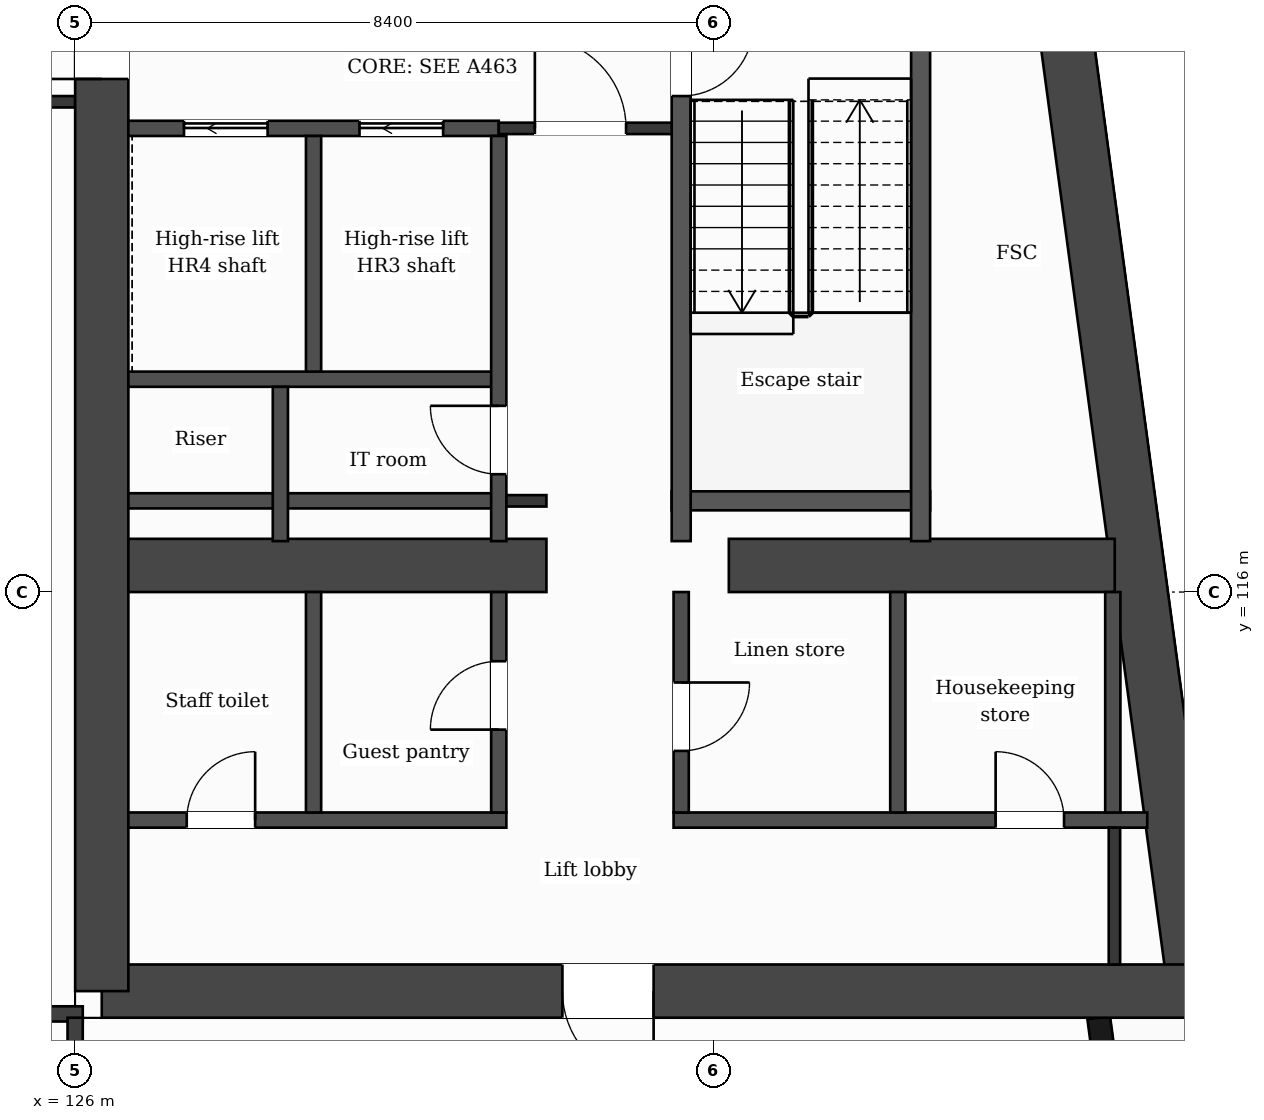
"""IFC4 building model, lengths in metres.
Left out: names, types, materials, properties, quantities, classifications, styles, units other than length and angle.
Written with IfcOpenShell. Run it as: python <this file> out.ifc"""

import sys

from ifc_helpers import new_model, si_unit, direction, frame, frame_2d, origin, place, context, subcontext, project, spatial, rectangle, extrude, element, fill, save


model = new_model("IFC4")
c1 = context("Model", 3, precision=1e-05, world=origin(), true_north=direction((0.0, 1.0)))
c2 = subcontext(c1, "Body", "Model", "MODEL_VIEW")
j1 = project(units=[si_unit("LENGTHUNIT", "METRE"), si_unit("PLANEANGLEUNIT", "RADIAN")], contexts=[c1])
p1 = place(None, origin())
s1 = spatial("IfcSite", under=j1, at=p1, CompositionType="ELEMENT")
p2 = place(p1, origin())
s2 = spatial("IfcBuilding", under=s1, at=p2, CompositionType="ELEMENT")
p3 = place(p2, frame((0.0, 0.0, 259.0)))
s3 = spatial("IfcBuildingStorey", under=s2, at=p3, CompositionType="ELEMENT", Elevation=259.0)
p4 = place(p3, frame((137.863, 132.05, 0.0), z_axis=(0.0, 0.0, 1.0), x_axis=(0.133406218907, -0.991061441464, 0.0)))
e1 = element("IfcWall", 1, at=p4, inside=s3, PredefinedType="SHEAR", context=c2, shape_type="SweptSolid", body=[
    extrude(rectangle(XDim=21.492, YDim=0.7, at=frame_2d((10.746, 0.0))), origin(), (0.0, 0.0, 1.0), 3.7),
])
p5 = place(p3, frame((140.73, 110.75, 0.0), z_axis=(0.0, 0.0, 1.0), x_axis=(-1.0, 0.0, 0.0)))
e2 = element("IfcWall", 2, at=p5, inside=s3, PredefinedType="SHEAR", context=c2, shape_type="SweptSolid", body=[
    extrude(rectangle(XDim=14.38, YDim=0.7, at=frame_2d((7.19, 0.0))), origin(), (0.0, 0.0, 1.0), 3.7),
])
p6 = place(p5, frame((7.12, 0.0, 0.0)))
e3 = element("IfcOpeningElement", 3, at=p6, cuts=e2, PredefinedType="OPENING", context=c2, shape_type="SweptSolid", body=[
    extrude(rectangle(XDim=1.2, YDim=2.1, at=frame_2d((0.6, 1.05))), frame((0.0, 0.36, 0.0), z_axis=(0.0, -1.0, 0.0), x_axis=(1.0, 0.0, 0.0)), (0.0, 0.0, 1.0), 0.72),
])
p7 = place(p3, frame((126.35, 110.75, 0.0), z_axis=(0.0, 0.0, 1.0), x_axis=(0.0, 1.0, 0.0)))
e4 = element("IfcWall", 4, at=p7, inside=s3, PredefinedType="SHEAR", context=c2, shape_type="SweptSolid", body=[
    extrude(rectangle(XDim=21.3, YDim=0.7, at=frame_2d((10.65, 0.0))), origin(), (0.0, 0.0, 1.0), 3.7),
])
p8 = place(p7, frame((12.0, 0.0, 0.0)))
e5 = element("IfcOpeningElement", 5, at=p8, cuts=e4, PredefinedType="OPENING", context=c2, shape_type="SweptSolid", body=[
    extrude(rectangle(XDim=1.4, YDim=2.1, at=frame_2d((0.7, 1.05))), frame((0.0, 0.36, 0.0), z_axis=(0.0, -1.0, 0.0), x_axis=(1.0, 0.0, 0.0)), (0.0, 0.0, 1.0), 0.72),
])
p9 = place(p3, frame((126.7, 116.35, 0.0), z_axis=(0.0, 0.0, 1.0), x_axis=(1.0, 0.0, 0.0)))
e6 = element("IfcWall", 6, at=p9, inside=s3, PredefinedType="SHEAR", context=c2, shape_type="SweptSolid", body=[
    extrude(rectangle(XDim=5.5, YDim=0.7, at=frame_2d((2.75, 0.0))), origin(), (0.0, 0.0, 1.0), 3.7),
])
p10 = place(p3, frame((134.6, 116.35, 0.0), z_axis=(0.0, 0.0, 1.0), x_axis=(1.0, 0.0, 0.0)))
e7 = element("IfcWall", 7, at=p10, inside=s3, PredefinedType="SHEAR", context=c2, shape_type="SweptSolid", body=[
    extrude(rectangle(XDim=5.077, YDim=0.7, at=frame_2d((2.539, 0.0))), origin(), (0.0, 0.0, 1.0), 3.7),
])
p11 = place(p3, frame((139.701, 108.65, 0.0), z_axis=(0.0, 0.0, 1.0), x_axis=(-0.133422458344, 0.991059255347, 0.0)))
e8 = element("IfcWall", 8, at=p11, inside=s3, PredefinedType="SOLIDWALL", context=c2, shape_type="SweptSolid", body=[
    extrude(rectangle(XDim=1.766, YDim=0.3, at=frame_2d((0.883, 0.0))), origin(), (0.0, 0.0, 1.0), 3.38),
])
p12 = place(p3, frame((100.7, 110.45, 0.0), z_axis=(0.0, 0.0, 1.0), x_axis=(1.0, 0.0, 0.0)))
e9 = element("IfcWall", 9, at=p12, inside=s3, PredefinedType="PARTITIONING", context=c2, shape_type="SweptSolid", body=[
    extrude(rectangle(XDim=25.4, YDim=0.2, at=frame_2d((12.7, 0.0))), origin(), (0.0, 0.0, 1.0), 3.38),
])
p13 = place(p3, frame((126.7, 113.0, 0.0), z_axis=(0.0, 0.0, 1.0), x_axis=(1.0, 0.0, 0.0)))
e10 = element("IfcWall", 10, at=p13, inside=s3, PredefinedType="PARTITIONING", context=c2, shape_type="SweptSolid", body=[
    extrude(rectangle(XDim=4.973, YDim=0.2, at=frame_2d((2.487, 0.0))), origin(), (0.0, 0.0, 1.0), 3.38),
])
p14 = place(p13, frame((0.768, 0.0, 0.0)))
e11 = element("IfcOpeningElement", 11, at=p14, cuts=e10, PredefinedType="OPENING", context=c2, shape_type="SweptSolid", body=[
    extrude(rectangle(XDim=0.9, YDim=2.1, at=frame_2d((0.45, 1.05))), frame((0.0, 0.11, 0.0), z_axis=(0.0, -1.0, 0.0), x_axis=(1.0, 0.0, 0.0)), (0.0, 0.0, 1.0), 0.22),
])
p15 = place(p3, frame((133.873, 113.0, 0.0), z_axis=(0.0, 0.0, 1.0), x_axis=(1.0, 0.0, 0.0)))
e12 = element("IfcWall", 12, at=p15, inside=s3, PredefinedType="PARTITIONING", context=c2, shape_type="SweptSolid", body=[
    extrude(rectangle(XDim=6.231, YDim=0.2, at=frame_2d((3.116, 0.0))), origin(), (0.0, 0.0, 1.0), 3.38),
])
p16 = place(p15, frame((4.237, 0.0, 0.0)))
e13 = element("IfcOpeningElement", 13, at=p16, cuts=e12, PredefinedType="OPENING", context=c2, shape_type="SweptSolid", body=[
    extrude(rectangle(XDim=0.9, YDim=2.1, at=frame_2d((0.45, 1.05))), frame((0.0, 0.11, 0.0), z_axis=(0.0, -1.0, 0.0), x_axis=(1.0, 0.0, 0.0)), (0.0, 0.0, 1.0), 0.22),
])
p17 = place(p3, frame((126.7, 117.2, 0.0), z_axis=(0.0, 0.0, 1.0), x_axis=(1.0, 0.0, 0.0)))
e14 = element("IfcWall", 14, at=p17, inside=s3, PredefinedType="PARTITIONING", context=c2, shape_type="SweptSolid", body=[
    extrude(rectangle(XDim=4.873, YDim=0.2, at=frame_2d((2.437, 0.0))), origin(), (0.0, 0.0, 1.0), 3.38),
])
p18 = place(p3, frame((131.573, 117.2, 0.0), z_axis=(0.0, 0.0, 1.0), x_axis=(1.0, 0.0, 0.0)))
e15 = element("IfcWall", 15, at=p18, inside=s3, PredefinedType="PARTITIONING", context=c2, shape_type="SweptSolid", body=[
    extrude(rectangle(XDim=0.627, YDim=0.15, at=frame_2d((0.313, 0.0))), origin(), (0.0, 0.0, 1.0), 3.38),
])
p19 = place(p3, frame((133.848, 117.2, 0.0), z_axis=(0.0, 0.0, 1.0), x_axis=(1.0, 0.0, 0.0)))
e16 = element("IfcWall", 16, at=p19, inside=s3, PredefinedType="PARTITIONING", context=c2, shape_type="SweptSolid", body=[
    extrude(rectangle(XDim=3.4, YDim=0.25, at=frame_2d((1.7, 0.0))), origin(), (0.0, 0.0, 1.0), 3.38),
])
p20 = place(p3, frame((126.7, 118.8, 0.0), z_axis=(0.0, 0.0, 1.0), x_axis=(1.0, 0.0, 0.0)))
e17 = element("IfcWall", 17, at=p20, inside=s3, PredefinedType="PARTITIONING", context=c2, shape_type="SweptSolid", body=[
    extrude(rectangle(XDim=4.873, YDim=0.2, at=frame_2d((2.437, 0.0))), origin(), (0.0, 0.0, 1.0), 3.38),
])
p21 = place(p3, frame((126.7, 122.1, 0.0), z_axis=(0.0, 0.0, 1.0), x_axis=(1.0, 0.0, 0.0)))
e18 = element("IfcWall", 18, at=p21, inside=s3, PredefinedType="PARTITIONING", context=c2, shape_type="SweptSolid", body=[
    extrude(rectangle(XDim=4.873, YDim=0.2, at=frame_2d((2.437, 0.0))), origin(), (0.0, 0.0, 1.0), 3.38),
])
p22 = place(p21, frame((3.041, 0.0, 0.0)))
e19 = element("IfcOpeningElement", 19, at=p22, cuts=e18, PredefinedType="OPENING", context=c2, shape_type="SweptSolid", body=[
    extrude(rectangle(XDim=1.1, YDim=2.1, at=frame_2d((0.55, 1.05))), frame((0.0, 0.11, 0.0), z_axis=(0.0, -1.0, 0.0), x_axis=(1.0, 0.0, 0.0)), (0.0, 0.0, 1.0), 0.22),
])
p23 = place(p21, frame((0.732, 0.0, 0.0)))
e20 = element("IfcOpeningElement", 20, at=p23, cuts=e18, PredefinedType="OPENING", context=c2, shape_type="SweptSolid", body=[
    extrude(rectangle(XDim=1.1, YDim=2.1, at=frame_2d((0.55, 1.05))), frame((0.0, 0.11, 0.0), z_axis=(0.0, -1.0, 0.0), x_axis=(1.0, 0.0, 0.0)), (0.0, 0.0, 1.0), 0.22),
])
p24 = place(p3, frame((131.573, 122.1, 0.0), z_axis=(0.0, 0.0, 1.0), x_axis=(1.0, 0.0, 0.0)))
e21 = element("IfcWall", 21, at=p24, inside=s3, PredefinedType="PARTITIONING", context=c2, shape_type="SweptSolid", body=[
    extrude(rectangle(XDim=2.4, YDim=0.15, at=frame_2d((1.2, 0.0))), origin(), (0.0, 0.0, 1.0), 3.38),
])
p25 = place(p24, frame((0.475, 0.0, 0.0)))
e22 = element("IfcOpeningElement", 22, at=p25, cuts=e21, PredefinedType="OPENING", context=c2, shape_type="SweptSolid", body=[
    extrude(rectangle(XDim=1.2, YDim=2.1, at=frame_2d((0.6, 1.05))), frame((0.0, 0.085, 0.0), z_axis=(0.0, -1.0, 0.0), x_axis=(1.0, 0.0, 0.0)), (0.0, 0.0, 1.0), 0.17),
])
p26 = place(p3, frame((100.8, 122.45, 0.0), z_axis=(0.0, 0.0, 1.0), x_axis=(1.0, 0.0, 0.0)))
e23 = element("IfcWall", 23, at=p26, inside=s3, PredefinedType="PARTITIONING", context=c2, shape_type="SweptSolid", body=[
    extrude(rectangle(XDim=25.2, YDim=0.15, at=frame_2d((12.6, 0.0))), origin(), (0.0, 0.0, 1.0), 3.38),
])
p27 = place(p26, frame((0.63, 0.0, 0.0)))
e24 = element("IfcOpeningElement", 24, at=p27, cuts=e23, PredefinedType="OPENING", context=c2, shape_type="SweptSolid", body=[
    extrude(rectangle(XDim=1.0, YDim=2.1, at=frame_2d((0.5, 1.05))), frame((0.0, 0.085, 0.0), z_axis=(0.0, -1.0, 0.0), x_axis=(1.0, 0.0, 0.0)), (0.0, 0.0, 1.0), 0.17),
])
p28 = place(p26, frame((6.875, 0.0, 0.0)))
e25 = element("IfcOpeningElement", 25, at=p28, cuts=e23, PredefinedType="OPENING", context=c2, shape_type="SweptSolid", body=[
    extrude(rectangle(XDim=0.95, YDim=2.1, at=frame_2d((0.475, 1.05))), frame((0.0, 0.085, 0.0), z_axis=(0.0, -1.0, 0.0), x_axis=(1.0, 0.0, 0.0)), (0.0, 0.0, 1.0), 0.17),
])
p29 = place(p26, frame((8.925, 0.0, 0.0)))
e26 = element("IfcOpeningElement", 26, at=p29, cuts=e23, PredefinedType="OPENING", context=c2, shape_type="SweptSolid", body=[
    extrude(rectangle(XDim=1.0, YDim=2.1, at=frame_2d((0.5, 1.05))), frame((0.0, 0.085, 0.0), z_axis=(0.0, -1.0, 0.0), x_axis=(1.0, 0.0, 0.0)), (0.0, 0.0, 1.0), 0.17),
])
p30 = place(p26, frame((20.5, 0.0, 0.0)))
e27 = element("IfcOpeningElement", 27, at=p30, cuts=e23, PredefinedType="OPENING", context=c2, shape_type="SweptSolid", body=[
    extrude(rectangle(XDim=1.0, YDim=2.1, at=frame_2d((0.5, 1.05))), frame((0.0, 0.085, 0.0), z_axis=(0.0, -1.0, 0.0), x_axis=(1.0, 0.0, 0.0)), (0.0, 0.0, 1.0), 0.17),
])
p31 = place(p3, frame((126.0, 108.79, 0.0), z_axis=(0.0, 0.0, 1.0), x_axis=(0.0, 1.0, 0.0)))
e28 = element("IfcWall", 28, at=p31, inside=s3, PredefinedType="PARTITIONING", context=c2, shape_type="SweptSolid", body=[
    extrude(rectangle(XDim=1.61, YDim=0.2, at=frame_2d((0.805, 0.0))), origin(), (0.0, 0.0, 1.0), 3.38),
])
p32 = place(p3, frame((128.7, 116.67, 0.0), z_axis=(0.0, 0.0, 1.0), x_axis=(0.0, 1.0, 0.0)))
e29 = element("IfcWall", 29, at=p32, inside=s3, PredefinedType="PARTITIONING", context=c2, shape_type="SweptSolid", body=[
    extrude(rectangle(XDim=2.03, YDim=0.2, at=frame_2d((1.015, 0.0))), origin(), (0.0, 0.0, 1.0), 3.38),
])
p33 = place(p3, frame((129.136, 113.1, 0.0), z_axis=(0.0, 0.0, 1.0), x_axis=(0.0, 1.0, 0.0)))
e30 = element("IfcWall", 30, at=p33, inside=s3, PredefinedType="PARTITIONING", context=c2, shape_type="SweptSolid", body=[
    extrude(rectangle(XDim=2.9, YDim=0.2, at=frame_2d((1.45, 0.0))), origin(), (0.0, 0.0, 1.0), 3.38),
])
p34 = place(p3, frame((129.136, 118.9, 0.0), z_axis=(0.0, 0.0, 1.0), x_axis=(0.0, 1.0, 0.0)))
e31 = element("IfcWall", 31, at=p34, inside=s3, PredefinedType="PARTITIONING", context=c2, shape_type="SweptSolid", body=[
    extrude(rectangle(XDim=3.1, YDim=0.2, at=frame_2d((1.55, 0.0))), origin(), (0.0, 0.0, 1.0), 3.38),
])
p35 = place(p3, frame((131.573, 113.1, 0.0), z_axis=(0.0, 0.0, 1.0), x_axis=(0.0, 1.0, 0.0)))
e32 = element("IfcWall", 32, at=p35, inside=s3, PredefinedType="PARTITIONING", context=c2, shape_type="SweptSolid", body=[
    extrude(rectangle(XDim=2.9, YDim=0.2, at=frame_2d((1.45, 0.0))), origin(), (0.0, 0.0, 1.0), 3.38),
])
p36 = place(p35, frame((1.09, 0.0, 0.0)))
e33 = element("IfcOpeningElement", 33, at=p36, cuts=e32, PredefinedType="OPENING", context=c2, shape_type="SweptSolid", body=[
    extrude(rectangle(XDim=0.9, YDim=2.1, at=frame_2d((0.45, 1.05))), frame((0.0, 0.11, 0.0), z_axis=(0.0, -1.0, 0.0), x_axis=(1.0, 0.0, 0.0)), (0.0, 0.0, 1.0), 0.22),
])
p37 = place(p3, frame((131.573, 116.67, 0.0), z_axis=(0.0, 0.0, 1.0), x_axis=(0.0, 1.0, 0.0)))
e34 = element("IfcWall", 34, at=p37, inside=s3, PredefinedType="PARTITIONING", context=c2, shape_type="SweptSolid", body=[
    extrude(rectangle(XDim=5.33, YDim=0.2, at=frame_2d((2.665, 0.0))), origin(), (0.0, 0.0, 1.0), 3.38),
])
p38 = place(p37, frame((0.88, 0.0, 0.0)))
e35 = element("IfcOpeningElement", 35, at=p38, cuts=e34, PredefinedType="OPENING", context=c2, shape_type="SweptSolid", body=[
    extrude(rectangle(XDim=0.9, YDim=2.1, at=frame_2d((0.45, 1.05))), frame((0.0, 0.11, 0.0), z_axis=(0.0, -1.0, 0.0), x_axis=(1.0, 0.0, 0.0)), (0.0, 0.0, 1.0), 0.22),
])
p39 = place(p3, frame((133.973, 113.1, 0.0), z_axis=(0.0, 0.0, 1.0), x_axis=(0.0, 1.0, 0.0)))
e36 = element("IfcWall", 36, at=p39, inside=s3, PredefinedType="PARTITIONING", context=c2, shape_type="SweptSolid", body=[
    extrude(rectangle(XDim=2.9, YDim=0.2, at=frame_2d((1.45, 0.0))), origin(), (0.0, 0.0, 1.0), 3.38),
])
p40 = place(p39, frame((0.81, 0.0, 0.0)))
e37 = element("IfcOpeningElement", 37, at=p40, cuts=e36, PredefinedType="OPENING", context=c2, shape_type="SweptSolid", body=[
    extrude(rectangle(XDim=0.9, YDim=2.1, at=frame_2d((0.45, 1.05))), frame((0.0, 0.11, 0.0), z_axis=(0.0, -1.0, 0.0), x_axis=(1.0, 0.0, 0.0)), (0.0, 0.0, 1.0), 0.22),
])
p41 = place(p3, frame((133.973, 116.67, 0.0), z_axis=(0.0, 0.0, 1.0), x_axis=(0.0, 1.0, 0.0)))
e38 = element("IfcWall", 38, at=p41, inside=s3, PredefinedType="PARTITIONING", context=c2, shape_type="SweptSolid", body=[
    extrude(rectangle(XDim=7.155, YDim=0.25, at=frame_2d((3.578, 0.0))), origin(), (0.0, 0.0, 1.0), 3.38),
])
p42 = place(p41, frame((5.855, 0.0, 0.0)))
e39 = element("IfcOpeningElement", 39, at=p42, cuts=e38, PredefinedType="OPENING", context=c2, shape_type="SweptSolid", body=[
    extrude(rectangle(XDim=0.95, YDim=2.1, at=frame_2d((0.475, 1.05))), frame((0.0, 0.135, 0.0), z_axis=(0.0, -1.0, 0.0), x_axis=(1.0, 0.0, 0.0)), (0.0, 0.0, 1.0), 0.27),
])
p43 = place(p3, frame((136.823, 113.1, 0.0), z_axis=(0.0, 0.0, 1.0), x_axis=(0.0, 1.0, 0.0)))
e40 = element("IfcWall", 40, at=p43, inside=s3, PredefinedType="PARTITIONING", context=c2, shape_type="SweptSolid", body=[
    extrude(rectangle(XDim=2.9, YDim=0.2, at=frame_2d((1.45, 0.0))), origin(), (0.0, 0.0, 1.0), 3.38),
])
p44 = place(p3, frame((137.123, 116.67, 0.0), z_axis=(0.0, 0.0, 1.0), x_axis=(0.0, 1.0, 0.0)))
e41 = element("IfcWall", 41, at=p44, inside=s3, PredefinedType="PARTITIONING", context=c2, shape_type="SweptSolid", body=[
    extrude(rectangle(XDim=7.155, YDim=0.25, at=frame_2d((3.578, 0.0))), origin(), (0.0, 0.0, 1.0), 3.38),
])
p45 = place(p3, frame((139.652, 113.1, 0.0), z_axis=(0.0, 0.0, 1.0), x_axis=(0.0, 1.0, 0.0)))
e42 = element("IfcWall", 42, at=p45, inside=s3, PredefinedType="PARTITIONING", context=c2, shape_type="SweptSolid", body=[
    extrude(rectangle(XDim=2.9, YDim=0.2, at=frame_2d((1.45, 0.0))), origin(), (0.0, 0.0, 1.0), 3.38),
])
p46 = place(p3, frame((139.673, 111.1, 0.0), z_axis=(0.0, 0.0, 1.0), x_axis=(0.0, 1.0, 0.0)))
e43 = element("IfcWall", 43, at=p46, inside=s3, PredefinedType="PARTITIONING", context=c2, shape_type="SweptSolid", body=[
    extrude(rectangle(XDim=1.8, YDim=0.15, at=frame_2d((0.9, 0.0))), origin(), (0.0, 0.0, 1.0), 3.38),
])
p47 = place(p25, origin())
e44 = element("IfcDoor", 44, at=p47, inside=s3, OperationType="SINGLE_SWING_LEFT", PredefinedType="DOOR", context=c2, shape_type="SweptSolid", body=[
    extrude(rectangle(XDim=1.2, YDim=2.1, at=frame_2d((0.6, 1.05))), frame((0.0, 0.025, 0.0), z_axis=(0.0, -1.0, 0.0), x_axis=(1.0, 0.0, 0.0)), (0.0, 0.0, 1.0), 0.05),
])
fill(e22, e44)
p48 = place(p22, origin())
e45 = element("IfcDoor", 45, at=p48, inside=s3, OperationType="SLIDING_TO_LEFT", PredefinedType="DOOR", context=c2, shape_type="SweptSolid", body=[
    extrude(rectangle(XDim=1.1, YDim=2.1, at=frame_2d((0.55, 1.05))), frame((0.0, 0.025, 0.0), z_axis=(0.0, -1.0, 0.0), x_axis=(1.0, 0.0, 0.0)), (0.0, 0.0, 1.0), 0.05),
])
fill(e19, e45)
p49 = place(p23, origin())
e46 = element("IfcDoor", 46, at=p49, inside=s3, OperationType="SLIDING_TO_LEFT", PredefinedType="DOOR", context=c2, shape_type="SweptSolid", body=[
    extrude(rectangle(XDim=1.1, YDim=2.1, at=frame_2d((0.55, 1.05))), frame((0.0, 0.025, 0.0), z_axis=(0.0, -1.0, 0.0), x_axis=(1.0, 0.0, 0.0)), (0.0, 0.0, 1.0), 0.05),
])
fill(e20, e46)
p50 = place(p42, origin())
e47 = element("IfcDoor", 47, at=p50, inside=s3, OperationType="SINGLE_SWING_RIGHT", PredefinedType="DOOR", context=c2, shape_type="SweptSolid", body=[
    extrude(rectangle(XDim=0.95, YDim=2.1, at=frame_2d((0.475, 1.05))), frame((0.0, 0.025, 0.0), z_axis=(0.0, -1.0, 0.0), x_axis=(1.0, 0.0, 0.0)), (0.0, 0.0, 1.0), 0.05),
])
fill(e39, e47)
p51 = place(p38, origin())
e48 = element("IfcDoor", 48, at=p51, inside=s3, OperationType="SINGLE_SWING_RIGHT", PredefinedType="DOOR", context=c2, shape_type="SweptSolid", body=[
    extrude(rectangle(XDim=0.9, YDim=2.1, at=frame_2d((0.45, 1.05))), frame((0.0, 0.025, 0.0), z_axis=(0.0, -1.0, 0.0), x_axis=(1.0, 0.0, 0.0)), (0.0, 0.0, 1.0), 0.05),
])
fill(e35, e48)
p52 = place(p16, origin())
e49 = element("IfcDoor", 49, at=p52, inside=s3, OperationType="SINGLE_SWING_LEFT", PredefinedType="DOOR", context=c2, shape_type="SweptSolid", body=[
    extrude(rectangle(XDim=0.9, YDim=2.1, at=frame_2d((0.45, 1.05))), frame((0.0, 0.025, 0.0), z_axis=(0.0, -1.0, 0.0), x_axis=(1.0, 0.0, 0.0)), (0.0, 0.0, 1.0), 0.05),
])
fill(e13, e49)
p53 = place(p40, origin())
e50 = element("IfcDoor", 50, at=p53, inside=s3, OperationType="SINGLE_SWING_RIGHT", PredefinedType="DOOR", context=c2, shape_type="SweptSolid", body=[
    extrude(rectangle(XDim=0.9, YDim=2.1, at=frame_2d((0.45, 1.05))), frame((0.0, 0.025, 0.0), z_axis=(0.0, -1.0, 0.0), x_axis=(1.0, 0.0, 0.0)), (0.0, 0.0, 1.0), 0.05),
])
fill(e37, e50)
p54 = place(p36, origin())
e51 = element("IfcDoor", 51, at=p54, inside=s3, OperationType="SINGLE_SWING_LEFT", PredefinedType="DOOR", context=c2, shape_type="SweptSolid", body=[
    extrude(rectangle(XDim=0.9, YDim=2.1, at=frame_2d((0.45, 1.05))), frame((0.0, 0.025, 0.0), z_axis=(0.0, -1.0, 0.0), x_axis=(1.0, 0.0, 0.0)), (0.0, 0.0, 1.0), 0.05),
])
fill(e33, e51)
p55 = place(p14, origin())
e52 = element("IfcDoor", 52, at=p55, inside=s3, OperationType="SINGLE_SWING_RIGHT", PredefinedType="DOOR", context=c2, shape_type="SweptSolid", body=[
    extrude(rectangle(XDim=0.9, YDim=2.1, at=frame_2d((0.45, 1.05))), frame((0.0, 0.025, 0.0), z_axis=(0.0, -1.0, 0.0), x_axis=(1.0, 0.0, 0.0)), (0.0, 0.0, 1.0), 0.05),
])
fill(e11, e52)
p56 = place(p6, origin())
e53 = element("IfcDoor", 53, at=p56, inside=s3, OperationType="SINGLE_SWING_LEFT", PredefinedType="DOOR", context=c2, shape_type="SweptSolid", body=[
    extrude(rectangle(XDim=1.2, YDim=2.1, at=frame_2d((0.6, 1.05))), frame((0.0, 0.025, 0.0), z_axis=(0.0, -1.0, 0.0), x_axis=(1.0, 0.0, 0.0)), (0.0, 0.0, 1.0), 0.05),
])
fill(e3, e53)
p57 = place(p8, origin())
e54 = element("IfcDoor", 54, at=p57, inside=s3, OperationType="SINGLE_SWING_LEFT", PredefinedType="DOOR", context=c2, shape_type="SweptSolid", body=[
    extrude(rectangle(XDim=1.4, YDim=2.1, at=frame_2d((0.7, 1.05))), frame((0.0, 0.025, 0.0), z_axis=(0.0, -1.0, 0.0), x_axis=(1.0, 0.0, 0.0)), (0.0, 0.0, 1.0), 0.05),
])
fill(e5, e54)
save(model, sys.argv[1])
